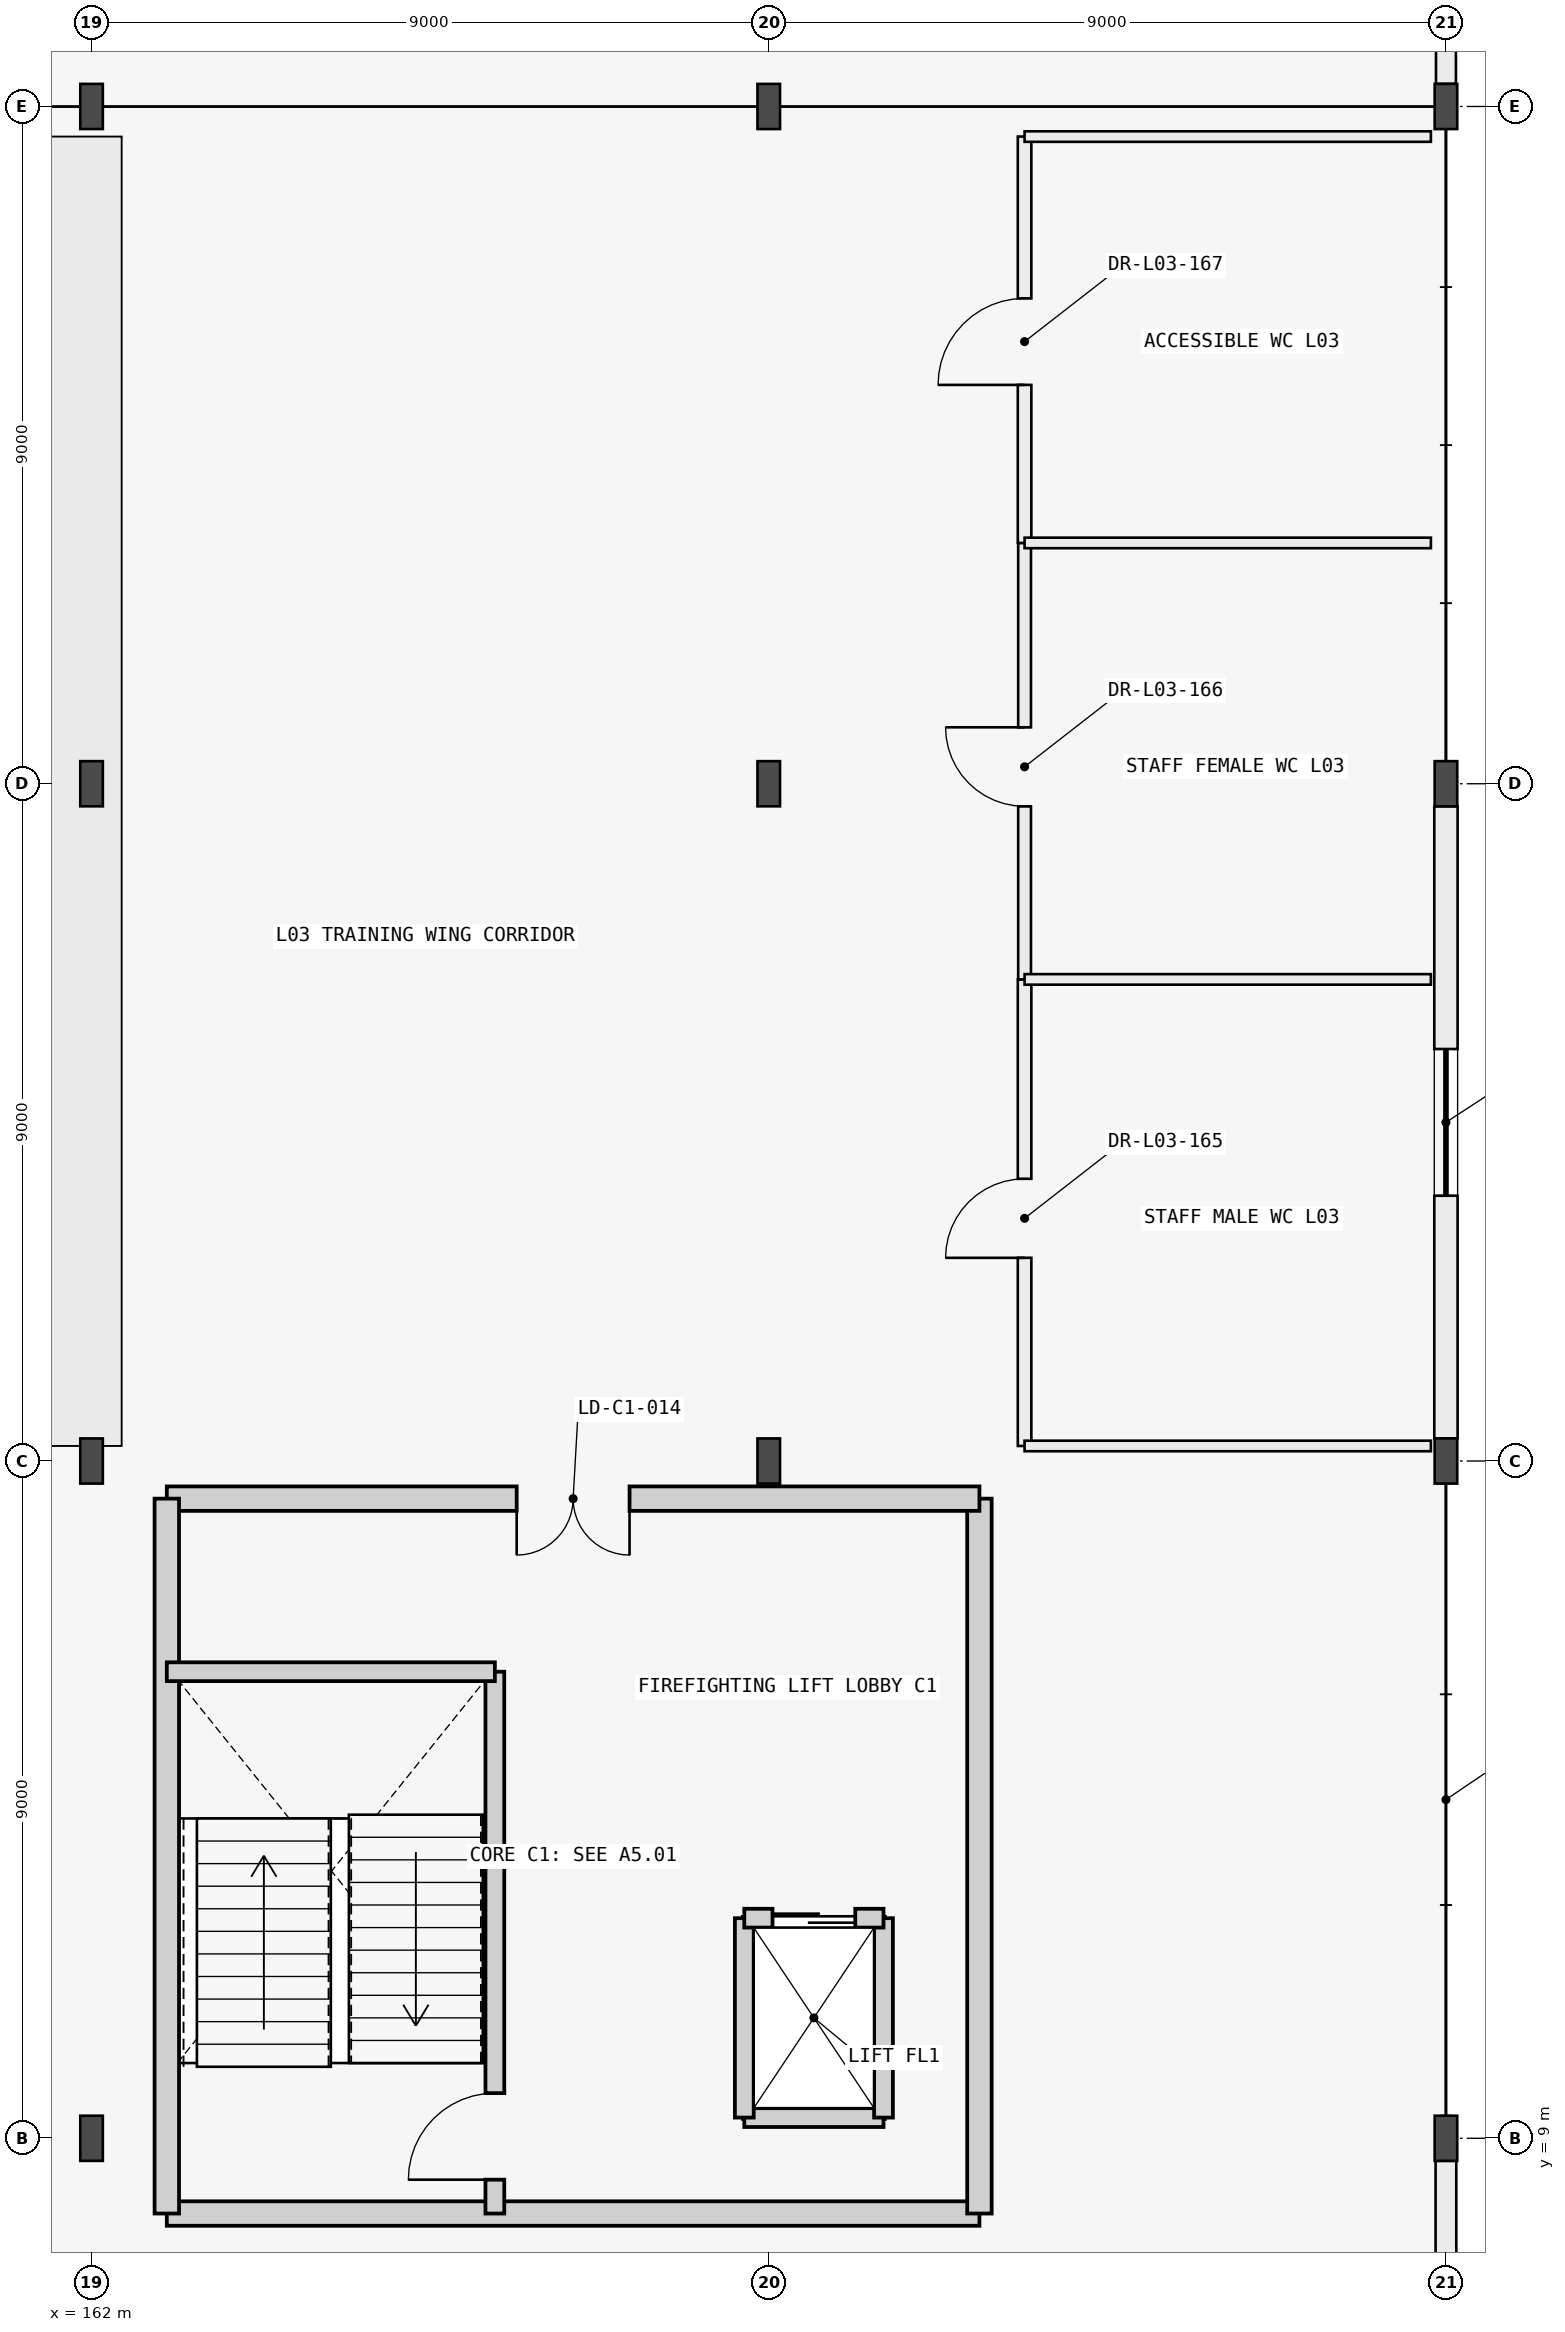
"""IFC4 building model, lengths in metres.
Left out: names, types, materials, properties, quantities, classifications, styles, units other than length and angle.
Written with IfcOpenShell. Run it as: python <this file> out.ifc"""

import sys

from ifc_helpers import new_model, si_unit, direction, frame, frame_2d, origin, origin_2d, place, context, subcontext, project, spatial, rectangle, i_section, extrude, element, fill, save


model = new_model("IFC4")
c1 = context("Model", 3, precision=1e-05, world=origin(), true_north=direction((0.0, 1.0)))
c2 = subcontext(c1, "Body", "Model", "MODEL_VIEW")
j1 = project(units=[si_unit("LENGTHUNIT", "METRE"), si_unit("PLANEANGLEUNIT", "RADIAN")], contexts=[c1])
p1 = place(None, origin())
s1 = spatial("IfcSite", under=j1, at=p1, CompositionType="ELEMENT")
p2 = place(p1, origin())
s2 = spatial("IfcBuilding", under=s1, at=p2, CompositionType="ELEMENT")
p3 = place(p2, frame((0.0, 0.0, 12.6)))
s3 = spatial("IfcBuildingStorey", under=s2, at=p3, CompositionType="ELEMENT", Elevation=12.6)
for number, where, z_axis, x_axis in (
    (1, (162.0, 9.0, 0.0), (0.0, 0.0, 1.0), (1.0, 0.0, 0.0)),
    (2, (180.0, 9.0, 0.0), (0.0, 0.0, 1.0), (1.0, 0.0, 0.0)),
    (3, (162.0, 18.0, 0.0), (0.0, 0.0, 1.0), (1.0, 0.0, 0.0)),
    (4, (171.0, 18.0, 0.0), (0.0, 0.0, 1.0), (1.0, 0.0, 0.0)),
    (5, (180.0, 18.0, 0.0), (0.0, 0.0, 1.0), (1.0, 0.0, 0.0)),
    (6, (162.0, 27.0, 0.0), (0.0, 0.0, 1.0), (1.0, 0.0, 0.0)),
    (7, (171.0, 27.0, 0.0), (0.0, 0.0, 1.0), (1.0, 0.0, 0.0)),
    (8, (180.0, 27.0, 0.0), (0.0, 0.0, 1.0), (1.0, 0.0, 0.0)),
    (9, (162.0, 36.0, 0.0), (0.0, 0.0, 1.0), (1.0, 0.0, 0.0)),
    (10, (171.0, 36.0, 0.0), (0.0, 0.0, 1.0), (1.0, 0.0, 0.0)),
    (11, (180.0, 36.0, 0.0), (0.0, 0.0, 1.0), (1.0, 0.0, 0.0)),
):
    element("IfcColumn", number, at=place(p3, frame(where, z_axis=z_axis, x_axis=x_axis)), inside=s3, PredefinedType="COLUMN", context=c2, shape_type="SweptSolid", body=[
        extrude(i_section(OverallWidth=0.3, OverallDepth=0.6, WebThickness=0.015, FlangeThickness=0.03, FilletRadius=0.027, at=origin_2d()), origin(), (0.0, 0.0, 1.0), 4.2),
    ])
p4 = place(p3, frame((180.0, 0.3, 0.0), z_axis=(0.0, 0.0, 1.0), x_axis=(0.0, 1.0, 0.0)))
e12 = element("IfcWall", 12, at=p4, inside=s3, PredefinedType="POLYGONAL", context=c2, shape_type="SweptSolid", body=[
    extrude(rectangle(XDim=8.4, YDim=0.275, at=frame_2d((4.2, 0.0))), origin(), (0.0, 0.0, 1.0), 3.6),
])
p5 = place(p4, frame((3.375, 0.0, 0.95)))
e13 = element("IfcOpeningElement", 13, at=p5, cuts=e12, PredefinedType="OPENING", context=c2, shape_type="SweptSolid", body=[
    extrude(rectangle(XDim=1.65, YDim=1.55, at=frame_2d((0.825, 0.775))), frame((0.0, 0.147, 0.0), z_axis=(0.0, -1.0, 0.0), x_axis=(1.0, 0.0, 0.0)), (0.0, 0.0, 1.0), 0.295),
])
p6 = place(p3, frame((180.0, 18.3, 0.0), z_axis=(0.0, 0.0, 1.0), x_axis=(0.0, 1.0, 0.0)))
e14 = element("IfcWall", 14, at=p6, inside=s3, PredefinedType="STANDARD", context=c2, shape_type="SweptSolid", body=[
    extrude(rectangle(XDim=8.4, YDim=0.31, at=frame_2d((4.2, 0.0))), origin(), (0.0, 0.0, 1.0), 3.6),
])
p7 = place(p6, frame((3.225, 0.0, 0.95)))
e15 = element("IfcOpeningElement", 15, at=p7, cuts=e14, PredefinedType="OPENING", context=c2, shape_type="SweptSolid", body=[
    extrude(rectangle(XDim=1.95, YDim=1.65, at=frame_2d((0.975, 0.825))), frame((0.0, 0.165, 0.0), z_axis=(0.0, -1.0, 0.0), x_axis=(1.0, 0.0, 0.0)), (0.0, 0.0, 1.0), 0.33),
])
p8 = place(p3, frame((180.0, 36.3, 0.0), z_axis=(0.0, 0.0, 1.0), x_axis=(0.0, 1.0, 0.0)))
e16 = element("IfcWall", 16, at=p8, inside=s3, PredefinedType="STANDARD", context=c2, shape_type="SweptSolid", body=[
    extrude(rectangle(XDim=8.4, YDim=0.265, at=frame_2d((4.2, 0.0))), origin(), (0.0, 0.0, 1.0), 3.6),
])
p9 = place(p8, frame((3.075, 0.0, 0.95)))
e17 = element("IfcOpeningElement", 17, at=p9, cuts=e16, PredefinedType="OPENING", context=c2, shape_type="SweptSolid", body=[
    extrude(rectangle(XDim=2.25, YDim=1.75, at=frame_2d((1.125, 0.875))), frame((0.0, 0.143, 0.0), z_axis=(0.0, -1.0, 0.0), x_axis=(1.0, 0.0, 0.0)), (0.0, 0.0, 1.0), 0.285),
])
p10 = place(p3, frame((163.0, 8.0, 0.0), z_axis=(0.0, 0.0, 1.0), x_axis=(1.0, 0.0, 0.0)))
e18 = element("IfcWall", 18, at=p10, inside=s3, PredefinedType="SHEAR", context=c2, shape_type="SweptSolid", body=[
    extrude(rectangle(XDim=10.8, YDim=0.325, at=frame_2d((5.4, 0.0))), origin(), (0.0, 0.0, 1.0), 3.925),
])
p11 = place(p3, frame((173.8, 8.0, 0.0), z_axis=(0.0, 0.0, 1.0), x_axis=(0.0, 1.0, 0.0)))
e19 = element("IfcWall", 19, at=p11, inside=s3, PredefinedType="SHEAR", context=c2, shape_type="SweptSolid", body=[
    extrude(rectangle(XDim=9.5, YDim=0.325, at=frame_2d((4.75, 0.0))), origin(), (0.0, 0.0, 1.0), 3.925),
])
p12 = place(p3, frame((173.8, 17.5, 0.0), z_axis=(0.0, 0.0, 1.0), x_axis=(-1.0, 0.0, 0.0)))
e20 = element("IfcWall", 20, at=p12, inside=s3, PredefinedType="SHEAR", context=c2, shape_type="SweptSolid", body=[
    extrude(rectangle(XDim=10.8, YDim=0.325, at=frame_2d((5.4, 0.0))), origin(), (0.0, 0.0, 1.0), 3.925),
])
p13 = place(p12, frame((4.65, 0.0, 0.0)))
e21 = element("IfcOpeningElement", 21, at=p13, cuts=e20, PredefinedType="OPENING", context=c2, shape_type="SweptSolid", body=[
    extrude(rectangle(XDim=1.5, YDim=2.2, at=frame_2d((0.75, 1.1))), frame((0.0, 0.172, 0.0), z_axis=(0.0, -1.0, 0.0), x_axis=(1.0, 0.0, 0.0)), (0.0, 0.0, 1.0), 0.345),
])
p14 = place(p3, frame((163.0, 17.5, 0.0), z_axis=(0.0, 0.0, 1.0), x_axis=(0.0, -1.0, 0.0)))
e22 = element("IfcWall", 22, at=p14, inside=s3, PredefinedType="SHEAR", context=c2, shape_type="SweptSolid", body=[
    extrude(rectangle(XDim=9.5, YDim=0.325, at=frame_2d((4.75, 0.0))), origin(), (0.0, 0.0, 1.0), 3.925),
])
p15 = place(p3, frame((167.36, 8.0, 0.0), z_axis=(0.0, 0.0, 1.0), x_axis=(0.0, 1.0, 0.0)))
e23 = element("IfcWall", 23, at=p15, inside=s3, PredefinedType="SHEAR", context=c2, shape_type="SweptSolid", body=[
    extrude(rectangle(XDim=7.2, YDim=0.25, at=frame_2d((3.6, 0.0))), origin(), (0.0, 0.0, 1.0), 3.925),
])
p16 = place(p15, frame((0.45, 0.0, 0.0)))
e24 = element("IfcOpeningElement", 24, at=p16, cuts=e23, PredefinedType="OPENING", context=c2, shape_type="SweptSolid", body=[
    extrude(rectangle(XDim=1.15, YDim=2.15, at=frame_2d((0.575, 1.075))), frame((0.0, 0.135, 0.0), z_axis=(0.0, -1.0, 0.0), x_axis=(1.0, 0.0, 0.0)), (0.0, 0.0, 1.0), 0.27),
])
p17 = place(p3, frame((163.0, 15.2, 0.0), z_axis=(0.0, 0.0, 1.0), x_axis=(1.0, 0.0, 0.0)))
e25 = element("IfcWall", 25, at=p17, inside=s3, PredefinedType="SHEAR", context=c2, shape_type="SweptSolid", body=[
    extrude(rectangle(XDim=4.36, YDim=0.25, at=frame_2d((2.18, 0.0))), origin(), (0.0, 0.0, 1.0), 3.925),
])
p18 = place(p3, frame((170.675, 9.275, 0.0), z_axis=(0.0, 0.0, 1.0), x_axis=(1.0, 0.0, 0.0)))
e26 = element("IfcWall", 26, at=p18, inside=s3, PredefinedType="SHEAR", context=c2, shape_type="SweptSolid", body=[
    extrude(rectangle(XDim=1.85, YDim=0.25, at=frame_2d((0.925, 0.0))), origin(), (0.0, 0.0, 1.0), 3.925),
])
for number, where, z_axis, x_axis in (
    (27, (170.675, 9.275, 0.0), (0.0, 0.0, 1.0), (0.0, 1.0, 0.0)),
    (28, (172.525, 9.275, 0.0), (0.0, 0.0, 1.0), (0.0, 1.0, 0.0)),
):
    element("IfcWall", number, at=place(p3, frame(where, z_axis=z_axis, x_axis=x_axis)), inside=s3, PredefinedType="SHEAR", context=c2, shape_type="SweptSolid", body=[
        extrude(rectangle(XDim=2.65, YDim=0.25, at=frame_2d((1.325, 0.0))), origin(), (0.0, 0.0, 1.0), 3.925),
    ])
p19 = place(p3, frame((170.675, 11.925, 0.0), z_axis=(0.0, 0.0, 1.0), x_axis=(1.0, 0.0, 0.0)))
e29 = element("IfcWall", 29, at=p19, inside=s3, PredefinedType="SHEAR", context=c2, shape_type="SweptSolid", body=[
    extrude(rectangle(XDim=1.85, YDim=0.25, at=frame_2d((0.925, 0.0))), origin(), (0.0, 0.0, 1.0), 3.925),
])
p20 = place(p19, frame((0.375, 0.0, 0.0)))
e30 = element("IfcOpeningElement", 30, at=p20, cuts=e29, PredefinedType="OPENING", context=c2, shape_type="SweptSolid", body=[
    extrude(rectangle(XDim=1.1, YDim=2.15, at=frame_2d((0.55, 1.075))), frame((0.0, 0.135, 0.0), z_axis=(0.0, -1.0, 0.0), x_axis=(1.0, 0.0, 0.0)), (0.0, 0.0, 1.0), 0.27),
])
p21 = place(p3, frame((174.4, 18.2, 0.0), z_axis=(0.0, 0.0, 1.0), x_axis=(0.0, 1.0, 0.0)))
e31 = element("IfcWall", 31, at=p21, inside=s3, PredefinedType="PARTITIONING", context=c2, shape_type="SweptSolid", body=[
    extrude(rectangle(XDim=6.2, YDim=0.18, at=frame_2d((3.1, 0.0))), origin(), (0.0, 0.0, 1.0), 3.6),
])
p22 = place(p21, frame((2.5, 0.0, 0.0)))
e32 = element("IfcOpeningElement", 32, at=p22, cuts=e31, PredefinedType="OPENING", context=c2, shape_type="SweptSolid", body=[
    extrude(rectangle(XDim=1.05, YDim=2.1, at=frame_2d((0.525, 1.05))), frame((0.0, 0.1, 0.0), z_axis=(0.0, -1.0, 0.0), x_axis=(1.0, 0.0, 0.0)), (0.0, 0.0, 1.0), 0.2),
])
p23 = place(p3, frame((174.4, 24.4, 0.0), z_axis=(0.0, 0.0, 1.0), x_axis=(0.0, 1.0, 0.0)))
e33 = element("IfcWall", 33, at=p23, inside=s3, PredefinedType="PARTITIONING", context=c2, shape_type="SweptSolid", body=[
    extrude(rectangle(XDim=5.8, YDim=0.17, at=frame_2d((2.9, 0.0))), origin(), (0.0, 0.0, 1.0), 3.6),
])
p24 = place(p23, frame((2.3, 0.0, 0.0)))
e34 = element("IfcOpeningElement", 34, at=p24, cuts=e33, PredefinedType="OPENING", context=c2, shape_type="SweptSolid", body=[
    extrude(rectangle(XDim=1.05, YDim=2.1, at=frame_2d((0.525, 1.05))), frame((0.0, 0.095, 0.0), z_axis=(0.0, -1.0, 0.0), x_axis=(1.0, 0.0, 0.0)), (0.0, 0.0, 1.0), 0.19),
])
p25 = place(p3, frame((174.4, 30.2, 0.0), z_axis=(0.0, 0.0, 1.0), x_axis=(0.0, 1.0, 0.0)))
e35 = element("IfcWall", 35, at=p25, inside=s3, PredefinedType="PARTITIONING", context=c2, shape_type="SweptSolid", body=[
    extrude(rectangle(XDim=5.4, YDim=0.18, at=frame_2d((2.7, 0.0))), origin(), (0.0, 0.0, 1.0), 3.6),
])
p26 = place(p25, frame((2.1, 0.0, 0.0)))
e36 = element("IfcOpeningElement", 36, at=p26, cuts=e35, PredefinedType="OPENING", context=c2, shape_type="SweptSolid", body=[
    extrude(rectangle(XDim=1.15, YDim=2.15, at=frame_2d((0.575, 1.075))), frame((0.0, 0.1, 0.0), z_axis=(0.0, -1.0, 0.0), x_axis=(1.0, 0.0, 0.0)), (0.0, 0.0, 1.0), 0.2),
])
p27 = place(p3, frame((174.4, 18.2, 0.0), z_axis=(0.0, 0.0, 1.0), x_axis=(1.0, 0.0, 0.0)))
e37 = element("IfcWall", 37, at=p27, inside=s3, PredefinedType="PARTITIONING", context=c2, shape_type="SweptSolid", body=[
    extrude(rectangle(XDim=5.4, YDim=0.14, at=frame_2d((2.7, 0.0))), origin(), (0.0, 0.0, 1.0), 3.4),
])
for number, where, z_axis, x_axis in (
    (38, (174.4, 24.4, 0.0), (0.0, 0.0, 1.0), (1.0, 0.0, 0.0)),
    (39, (174.4, 30.2, 0.0), (0.0, 0.0, 1.0), (1.0, 0.0, 0.0)),
):
    element("IfcWall", number, at=place(p3, frame(where, z_axis=z_axis, x_axis=x_axis)), inside=s3, PredefinedType="PARTITIONING", context=c2, shape_type="SweptSolid", body=[
        extrude(rectangle(XDim=5.4, YDim=0.14, at=frame_2d((2.7, 0.0))), origin(), (0.0, 0.0, 1.0), 3.925),
    ])
p28 = place(p3, frame((174.4, 35.6, 0.0), z_axis=(0.0, 0.0, 1.0), x_axis=(1.0, 0.0, 0.0)))
e40 = element("IfcWall", 40, at=p28, inside=s3, PredefinedType="PARTITIONING", context=c2, shape_type="SweptSolid", body=[
    extrude(rectangle(XDim=5.4, YDim=0.14, at=frame_2d((2.7, 0.0))), origin(), (0.0, 0.0, 1.0), 3.4),
])
p29 = place(p7, origin())
e41 = element("IfcWindow", 41, at=p29, inside=s3, PartitioningType="SINGLE_PANEL", PredefinedType="WINDOW", context=c2, shape_type="SweptSolid", body=[
    extrude(rectangle(XDim=1.95, YDim=1.65, at=frame_2d((0.975, 0.825))), frame((0.0, 0.03, 0.0), z_axis=(0.0, -1.0, 0.0), x_axis=(1.0, 0.0, 0.0)), (0.0, 0.0, 1.0), 0.06),
])
fill(e15, e41)
p30 = place(p16, origin())
e42 = element("IfcDoor", 42, at=p30, inside=s3, OperationType="SINGLE_SWING_LEFT", PredefinedType="DOOR", context=c2, shape_type="SweptSolid", body=[
    extrude(rectangle(XDim=1.15, YDim=2.15, at=frame_2d((0.575, 1.075))), frame((0.0, 0.025, 0.0), z_axis=(0.0, -1.0, 0.0), x_axis=(1.0, 0.0, 0.0)), (0.0, 0.0, 1.0), 0.05),
])
fill(e24, e42)
p31 = place(p13, origin())
e43 = element("IfcDoor", 43, at=p31, inside=s3, OperationType="DOUBLE_DOOR_SINGLE_SWING", PredefinedType="DOOR", context=c2, shape_type="SweptSolid", body=[
    extrude(rectangle(XDim=1.5, YDim=2.2, at=frame_2d((0.75, 1.1))), frame((0.0, 0.025, 0.0), z_axis=(0.0, -1.0, 0.0), x_axis=(1.0, 0.0, 0.0)), (0.0, 0.0, 1.0), 0.05),
])
fill(e21, e43)
p32 = place(p20, origin())
e44 = element("IfcDoor", 44, at=p32, inside=s3, OperationType="DOUBLE_DOOR_SLIDING", PredefinedType="USERDEFINED", context=c2, shape_type="SweptSolid", body=[
    extrude(rectangle(XDim=1.1, YDim=2.15, at=frame_2d((0.55, 1.075))), frame((0.0, 0.025, 0.0), z_axis=(0.0, -1.0, 0.0), x_axis=(1.0, 0.0, 0.0)), (0.0, 0.0, 1.0), 0.05),
])
fill(e30, e44)
p33 = place(p22, origin())
e45 = element("IfcDoor", 45, at=p33, inside=s3, OperationType="SINGLE_SWING_LEFT", PredefinedType="DOOR", context=c2, shape_type="SweptSolid", body=[
    extrude(rectangle(XDim=1.05, YDim=2.1, at=frame_2d((0.525, 1.05))), frame((0.0, 0.025, 0.0), z_axis=(0.0, -1.0, 0.0), x_axis=(1.0, 0.0, 0.0)), (0.0, 0.0, 1.0), 0.05),
])
fill(e32, e45)
p34 = place(p24, origin())
e46 = element("IfcDoor", 46, at=p34, inside=s3, OperationType="SINGLE_SWING_RIGHT", PredefinedType="DOOR", context=c2, shape_type="SweptSolid", body=[
    extrude(rectangle(XDim=1.05, YDim=2.1, at=frame_2d((0.525, 1.05))), frame((0.0, 0.025, 0.0), z_axis=(0.0, -1.0, 0.0), x_axis=(1.0, 0.0, 0.0)), (0.0, 0.0, 1.0), 0.05),
])
fill(e34, e46)
p35 = place(p26, origin())
e47 = element("IfcDoor", 47, at=p35, inside=s3, OperationType="SINGLE_SWING_LEFT", PredefinedType="DOOR", context=c2, shape_type="SweptSolid", body=[
    extrude(rectangle(XDim=1.15, YDim=2.15, at=frame_2d((0.575, 1.075))), frame((0.0, 0.025, 0.0), z_axis=(0.0, -1.0, 0.0), x_axis=(1.0, 0.0, 0.0)), (0.0, 0.0, 1.0), 0.05),
])
fill(e36, e47)
save(model, sys.argv[1])
